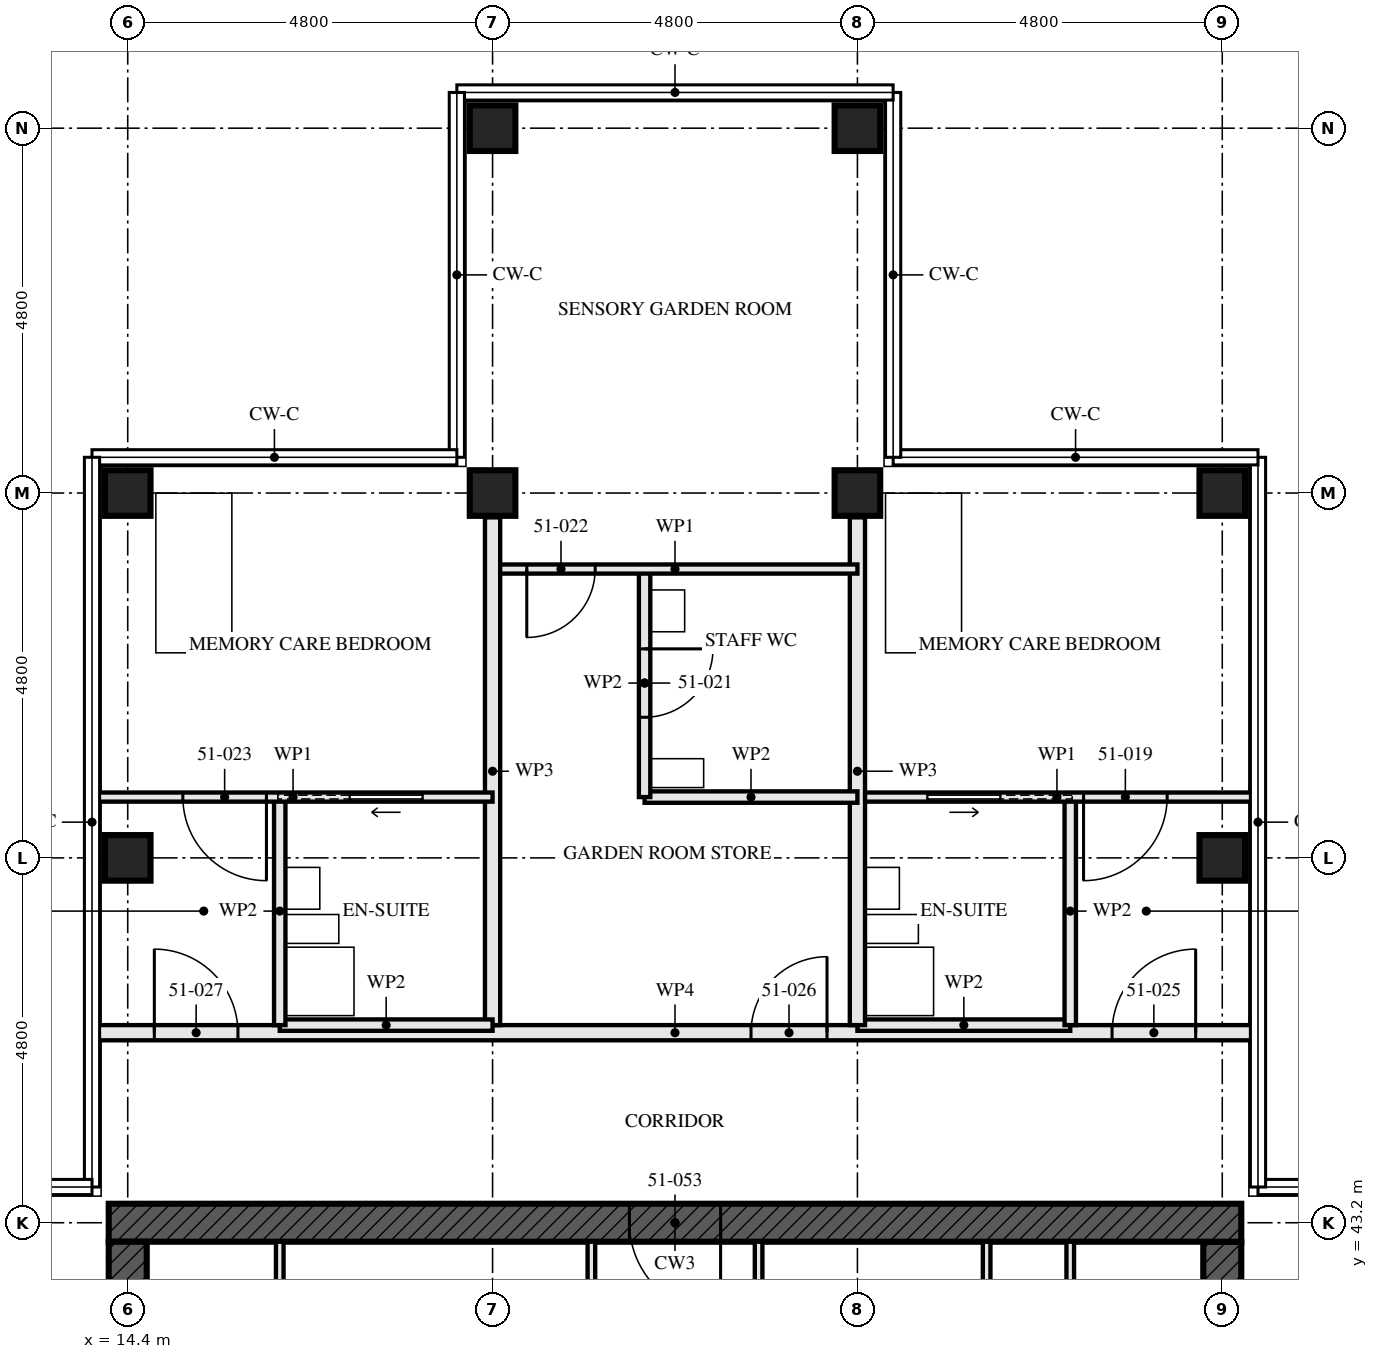
"""IFC4 building model, lengths in metres.
Left out: names, types, materials, properties, quantities, classifications, styles, units other than length and angle.
Written with IfcOpenShell. Run it as: python <this file> out.ifc"""

import sys

from ifc_helpers import new_model, si_unit, direction, frame, frame_2d, origin, origin_2d, place, context, subcontext, project, spatial, rectangle, hollow_rectangle, extrude, element, fill, save


model = new_model("IFC4")
c1 = context("Model", 3, precision=1e-05, world=origin(), true_north=direction((0.0, 1.0)))
c2 = subcontext(c1, "Body", "Model", "MODEL_VIEW")
j1 = project(units=[si_unit("LENGTHUNIT", "METRE"), si_unit("PLANEANGLEUNIT", "RADIAN")], contexts=[c1])
p1 = place(None, origin())
s1 = spatial("IfcSite", under=j1, at=p1, CompositionType="ELEMENT")
p2 = place(p1, origin())
s2 = spatial("IfcBuilding", under=s1, at=p2, CompositionType="ELEMENT")
p3 = place(p2, frame((0.0, 0.0, 186.5)))
s3 = spatial("IfcBuildingStorey", under=s2, at=p3, CompositionType="ELEMENT", Elevation=186.5)
for number, where, z_axis, x_axis in (
    (1, (14.4, 48.0, 0.0), (0.0, 0.0, 1.0), (1.0, 0.0, 0.0)),
    (2, (14.4, 52.8, 0.0), (0.0, 0.0, 1.0), (0.0, 1.0, 0.0)),
    (3, (19.2, 52.8, 0.0), (0.0, 0.0, 1.0), (0.0, 1.0, 0.0)),
    (4, (19.2, 57.6, 0.0), (0.0, 0.0, 1.0), (0.0, 1.0, 0.0)),
    (5, (24.0, 52.8, 0.0), (0.0, 0.0, 1.0), (0.0, 1.0, 0.0)),
    (6, (24.0, 57.6, 0.0), (0.0, 0.0, 1.0), (0.0, 1.0, 0.0)),
    (7, (28.8, 48.0, 0.0), (0.0, 0.0, 1.0), (1.0, 0.0, 0.0)),
    (8, (28.8, 52.8, 0.0), (0.0, 0.0, 1.0), (0.0, 1.0, 0.0)),
):
    element("IfcColumn", number, at=place(p3, frame(where, z_axis=z_axis, x_axis=x_axis)), inside=s3, PredefinedType="COLUMN", context=c2, shape_type="SweptSolid", body=[
        extrude(hollow_rectangle(XDim=0.6, YDim=0.6, WallThickness=0.08, at=origin_2d()), origin(), (0.0, 0.0, 1.0), 3.5),
    ])
p4 = place(p3, frame((29.05, 43.2, -0.17), z_axis=(0.0, 0.0, 1.0), x_axis=(-1.0, 0.0, 0.0)))
e9 = element("IfcWall", 9, at=p4, inside=s3, PredefinedType="SHEAR", context=c2, shape_type="SweptSolid", body=[
    extrude(rectangle(XDim=14.9, YDim=0.5, at=frame_2d((7.45, 0.0))), origin(), (0.0, 0.0, 1.0), 3.42),
])
p5 = place(p4, frame((6.85, 0.0, 0.17)))
e10 = element("IfcOpeningElement", 10, at=p5, cuts=e9, PredefinedType="OPENING", context=c2, shape_type="SweptSolid", body=[
    extrude(rectangle(XDim=1.2, YDim=2.1, at=frame_2d((0.6, 1.05))), frame((0.0, 0.26, 0.0), z_axis=(0.0, -1.0, 0.0), x_axis=(1.0, 0.0, 0.0)), (0.0, 0.0, 1.0), 0.521),
])
p6 = place(p3, frame((14.4, 42.95, -0.17), z_axis=(0.0, 0.0, 1.0), x_axis=(0.0, -1.0, 0.0)))
e11 = element("IfcWall", 11, at=p6, inside=s3, PredefinedType="SHEAR", context=c2, shape_type="SweptSolid", body=[
    extrude(rectangle(XDim=13.9, YDim=0.5, at=frame_2d((6.95, 0.0))), origin(), (0.0, 0.0, 1.0), 3.42),
])
p7 = place(p6, frame((6.35, 0.0, 0.17)))
e12 = element("IfcOpeningElement", 12, at=p7, cuts=e11, PredefinedType="OPENING", context=c2, shape_type="SweptSolid", body=[
    extrude(rectangle(XDim=1.2, YDim=2.1, at=frame_2d((0.6, 1.05))), frame((0.0, 0.26, 0.0), z_axis=(0.0, -1.0, 0.0), x_axis=(1.0, 0.0, 0.0)), (0.0, 0.0, 1.0), 0.521),
])
p8 = place(p3, frame((28.8, 29.05, -0.17), z_axis=(0.0, 0.0, 1.0), x_axis=(0.0, 1.0, 0.0)))
e13 = element("IfcWall", 13, at=p8, inside=s3, PredefinedType="SHEAR", context=c2, shape_type="SweptSolid", body=[
    extrude(rectangle(XDim=13.9, YDim=0.5, at=frame_2d((6.95, 0.0))), origin(), (0.0, 0.0, 1.0), 3.42),
])
p9 = place(p8, frame((6.35, 0.0, 0.17)))
e14 = element("IfcOpeningElement", 14, at=p9, cuts=e13, PredefinedType="OPENING", context=c2, shape_type="SweptSolid", body=[
    extrude(rectangle(XDim=1.2, YDim=2.1, at=frame_2d((0.6, 1.05))), frame((0.0, 0.26, 0.0), z_axis=(0.0, -1.0, 0.0), x_axis=(1.0, 0.0, 0.0)), (0.0, 0.0, 1.0), 0.521),
])
p10 = place(p3, frame((26.8, 48.8, 0.0), z_axis=(0.0, 0.0, 1.0), x_axis=(0.0, -1.0, 0.0)))
e15 = element("IfcWall", 15, at=p10, inside=s3, PredefinedType="PARTITIONING", context=c2, shape_type="SweptSolid", body=[
    extrude(rectangle(XDim=3.0, YDim=0.15, at=frame_2d((1.5, 0.0))), origin(), (0.0, 0.0, 1.0), 2.04),
])
p11 = place(p3, frame((26.8, 45.8, 0.0), z_axis=(0.0, 0.0, 1.0), x_axis=(-1.0, 0.0, 0.0)))
e16 = element("IfcWall", 16, at=p11, inside=s3, PredefinedType="PARTITIONING", context=c2, shape_type="SweptSolid", body=[
    extrude(rectangle(XDim=2.8, YDim=0.15, at=frame_2d((1.4, 0.0))), origin(), (0.0, 0.0, 1.0), 3.25),
])
p12 = place(p3, frame((29.25, 48.8, 0.0), z_axis=(0.0, 0.0, 1.0), x_axis=(-1.0, 0.0, 0.0)))
e17 = element("IfcWall", 17, at=p12, inside=s3, PredefinedType="PARTITIONING", context=c2, shape_type="SweptSolid", body=[
    extrude(rectangle(XDim=5.25, YDim=0.12, at=frame_2d((2.625, 0.0))), origin(), (0.0, 0.0, 1.0), 2.04),
])
p13 = place(p12, frame((1.175, 0.0, 0.0)))
e18 = element("IfcOpeningElement", 18, at=p13, cuts=e17, PredefinedType="OPENING", context=c2, shape_type="SweptSolid", body=[
    extrude(rectangle(XDim=1.1, YDim=2.0, at=frame_2d((0.55, 1.0))), frame((0.0, 0.071, 0.0), z_axis=(0.0, -1.0, 0.0), x_axis=(1.0, 0.0, 0.0)), (0.0, 0.0, 1.0), 0.141),
])
p14 = place(p12, frame((3.375, 0.0, 0.0)))
e19 = element("IfcOpeningElement", 19, at=p14, cuts=e17, PredefinedType="OPENING", context=c2, shape_type="SweptSolid", body=[
    extrude(rectangle(XDim=0.95, YDim=2.0, at=frame_2d((0.475, 1.0))), frame((0.0, 0.071, 0.0), z_axis=(0.0, -1.0, 0.0), x_axis=(1.0, 0.0, 0.0)), (0.0, 0.0, 1.0), 0.141),
])
p15 = place(p3, frame((24.0, 52.48, 0.0), z_axis=(0.0, 0.0, 1.0), x_axis=(0.0, -1.0, 0.0)))
e20 = element("IfcWall", 20, at=p15, inside=s3, PredefinedType="PARTITIONING", context=c2, shape_type="SweptSolid", body=[
    extrude(rectangle(XDim=6.68, YDim=0.2, at=frame_2d((3.34, 0.0))), origin(), (0.0, 0.0, 1.0), 2.04),
])
p16 = place(p3, frame((21.2, 51.8, 0.0), z_axis=(0.0, 0.0, 1.0), x_axis=(0.0, -1.0, 0.0)))
e21 = element("IfcWall", 21, at=p16, inside=s3, PredefinedType="PARTITIONING", context=c2, shape_type="SweptSolid", body=[
    extrude(rectangle(XDim=3.0, YDim=0.15, at=frame_2d((1.5, 0.0))), origin(), (0.0, 0.0, 1.0), 3.25),
])
p17 = place(p16, frame((1.05, 0.0, 0.0)))
e22 = element("IfcOpeningElement", 22, at=p17, cuts=e21, PredefinedType="OPENING", context=c2, shape_type="SweptSolid", body=[
    extrude(rectangle(XDim=0.9, YDim=2.1, at=frame_2d((0.45, 1.05))), frame((0.0, 0.085, 0.0), z_axis=(0.0, -1.0, 0.0), x_axis=(1.0, 0.0, 0.0)), (0.0, 0.0, 1.0), 0.171),
])
p18 = place(p3, frame((24.0, 48.8, 0.0), z_axis=(0.0, 0.0, 1.0), x_axis=(-1.0, 0.0, 0.0)))
e23 = element("IfcWall", 23, at=p18, inside=s3, PredefinedType="PARTITIONING", context=c2, shape_type="SweptSolid", body=[
    extrude(rectangle(XDim=2.8, YDim=0.15, at=frame_2d((1.4, 0.0))), origin(), (0.0, 0.0, 1.0), 3.25),
])
p19 = place(p3, frame((24.0, 51.8, 0.0), z_axis=(0.0, 0.0, 1.0), x_axis=(-1.0, 0.0, 0.0)))
e24 = element("IfcWall", 24, at=p19, inside=s3, PredefinedType="PARTITIONING", context=c2, shape_type="SweptSolid", body=[
    extrude(rectangle(XDim=4.8, YDim=0.12, at=frame_2d((2.4, 0.0))), origin(), (0.0, 0.0, 1.0), 3.25),
])
p20 = place(p19, frame((3.45, 0.0, 0.0)))
e25 = element("IfcOpeningElement", 25, at=p20, cuts=e24, PredefinedType="OPENING", context=c2, shape_type="SweptSolid", body=[
    extrude(rectangle(XDim=0.9, YDim=2.1, at=frame_2d((0.45, 1.05))), frame((0.0, 0.071, 0.0), z_axis=(0.0, -1.0, 0.0), x_axis=(1.0, 0.0, 0.0)), (0.0, 0.0, 1.0), 0.141),
])
p21 = place(p3, frame((19.2, 52.48, 0.0), z_axis=(0.0, 0.0, 1.0), x_axis=(0.0, -1.0, 0.0)))
e26 = element("IfcWall", 26, at=p21, inside=s3, PredefinedType="PARTITIONING", context=c2, shape_type="SweptSolid", body=[
    extrude(rectangle(XDim=6.68, YDim=0.2, at=frame_2d((3.34, 0.0))), origin(), (0.0, 0.0, 1.0), 2.04),
])
p22 = place(p3, frame((16.4, 48.8, 0.0), z_axis=(0.0, 0.0, 1.0), x_axis=(0.0, -1.0, 0.0)))
e27 = element("IfcWall", 27, at=p22, inside=s3, PredefinedType="PARTITIONING", context=c2, shape_type="SweptSolid", body=[
    extrude(rectangle(XDim=3.0, YDim=0.15, at=frame_2d((1.5, 0.0))), origin(), (0.0, 0.0, 1.0), 2.04),
])
p23 = place(p3, frame((19.2, 45.8, 0.0), z_axis=(0.0, 0.0, 1.0), x_axis=(-1.0, 0.0, 0.0)))
e28 = element("IfcWall", 28, at=p23, inside=s3, PredefinedType="PARTITIONING", context=c2, shape_type="SweptSolid", body=[
    extrude(rectangle(XDim=2.8, YDim=0.15, at=frame_2d((1.4, 0.0))), origin(), (0.0, 0.0, 1.0), 3.25),
])
p24 = place(p3, frame((19.2, 48.8, 0.0), z_axis=(0.0, 0.0, 1.0), x_axis=(-1.0, 0.0, 0.0)))
e29 = element("IfcWall", 29, at=p24, inside=s3, PredefinedType="PARTITIONING", context=c2, shape_type="SweptSolid", body=[
    extrude(rectangle(XDim=5.25, YDim=0.12, at=frame_2d((2.625, 0.0))), origin(), (0.0, 0.0, 1.0), 2.04),
])
p25 = place(p24, frame((2.975, 0.0, 0.0)))
e30 = element("IfcOpeningElement", 30, at=p25, cuts=e29, PredefinedType="OPENING", context=c2, shape_type="SweptSolid", body=[
    extrude(rectangle(XDim=1.1, YDim=2.0, at=frame_2d((0.55, 1.0))), frame((0.0, 0.071, 0.0), z_axis=(0.0, -1.0, 0.0), x_axis=(1.0, 0.0, 0.0)), (0.0, 0.0, 1.0), 0.141),
])
p26 = place(p24, frame((0.925, 0.0, 0.0)))
e31 = element("IfcOpeningElement", 31, at=p26, cuts=e29, PredefinedType="OPENING", context=c2, shape_type="SweptSolid", body=[
    extrude(rectangle(XDim=0.95, YDim=2.0, at=frame_2d((0.475, 1.0))), frame((0.0, 0.071, 0.0), z_axis=(0.0, -1.0, 0.0), x_axis=(1.0, 0.0, 0.0)), (0.0, 0.0, 1.0), 0.141),
])
p27 = place(p3, frame((29.25, 45.7, 0.0), z_axis=(0.0, 0.0, 1.0), x_axis=(-1.0, 0.0, 0.0)))
e32 = element("IfcWall", 32, at=p27, inside=s3, PredefinedType="PARTITIONING", context=c2, shape_type="SweptSolid", body=[
    extrude(rectangle(XDim=15.3, YDim=0.2, at=frame_2d((7.65, 0.0))), origin(), (0.0, 0.0, 1.0), 2.04),
])
p28 = place(p27, frame((0.8, 0.0, 0.0)))
e33 = element("IfcOpeningElement", 33, at=p28, cuts=e32, PredefinedType="OPENING", context=c2, shape_type="SweptSolid", body=[
    extrude(rectangle(XDim=1.1, YDim=2.0, at=frame_2d((0.55, 1.0))), frame((0.0, 0.111, 0.0), z_axis=(0.0, -1.0, 0.0), x_axis=(1.0, 0.0, 0.0)), (0.0, 0.0, 1.0), 0.221),
])
p29 = place(p27, frame((5.65, 0.0, 0.0)))
e34 = element("IfcOpeningElement", 34, at=p29, cuts=e32, PredefinedType="OPENING", context=c2, shape_type="SweptSolid", body=[
    extrude(rectangle(XDim=1.0, YDim=2.0, at=frame_2d((0.5, 1.0))), frame((0.0, 0.111, 0.0), z_axis=(0.0, -1.0, 0.0), x_axis=(1.0, 0.0, 0.0)), (0.0, 0.0, 1.0), 0.221),
])
p30 = place(p27, frame((13.4, 0.0, 0.0)))
e35 = element("IfcOpeningElement", 35, at=p30, cuts=e32, PredefinedType="OPENING", context=c2, shape_type="SweptSolid", body=[
    extrude(rectangle(XDim=1.1, YDim=2.0, at=frame_2d((0.55, 1.0))), frame((0.0, 0.111, 0.0), z_axis=(0.0, -1.0, 0.0), x_axis=(1.0, 0.0, 0.0)), (0.0, 0.0, 1.0), 0.221),
])
for number, where, z_axis, x_axis in (
    (36, (16.4, 37.15, 0.0), (0.0, 0.0, 1.0), (0.0, 1.0, 0.0)),
    (37, (26.8, 37.15, 0.0), (0.0, 0.0, 1.0), (0.0, 1.0, 0.0)),
):
    element("IfcWall", number, at=place(p3, frame(where, z_axis=z_axis, x_axis=x_axis)), inside=s3, PredefinedType="SOLIDWALL", context=c2, shape_type="SweptSolid", body=[
        extrude(rectangle(XDim=5.8, YDim=0.1, at=frame_2d((2.9, 0.0))), origin(), (0.0, 0.0, 1.0), 3.25),
    ])
p31 = place(p3, frame((20.5, 37.15, 0.0), z_axis=(0.0, 0.0, 1.0), x_axis=(0.0, 1.0, 0.0)))
e38 = element("IfcWall", 38, at=p31, inside=s3, PredefinedType="SOLIDWALL", context=c2, shape_type="SweptSolid", body=[
    extrude(rectangle(XDim=5.8, YDim=0.1, at=frame_2d((2.9, 0.0))), origin(), (0.0, 0.0, 1.0), 3.25),
])
p32 = place(p31, frame((0.975, 0.0, 0.0)))
e39 = element("IfcOpeningElement", 39, at=p32, cuts=e38, PredefinedType="OPENING", context=c2, shape_type="SweptSolid", body=[
    extrude(rectangle(XDim=0.9, YDim=2.1, at=frame_2d((0.45, 1.05))), frame((0.0, 0.061, 0.0), z_axis=(0.0, -1.0, 0.0), x_axis=(1.0, 0.0, 0.0)), (0.0, 0.0, 1.0), 0.121),
])
p33 = place(p3, frame((22.7, 37.15, 0.0), z_axis=(0.0, 0.0, 1.0), x_axis=(0.0, 1.0, 0.0)))
e40 = element("IfcWall", 40, at=p33, inside=s3, PredefinedType="SOLIDWALL", context=c2, shape_type="SweptSolid", body=[
    extrude(rectangle(XDim=5.8, YDim=0.1, at=frame_2d((2.9, 0.0))), origin(), (0.0, 0.0, 1.0), 3.25),
])
p34 = place(p33, frame((0.975, 0.0, 0.0)))
e41 = element("IfcOpeningElement", 41, at=p34, cuts=e40, PredefinedType="OPENING", context=c2, shape_type="SweptSolid", body=[
    extrude(rectangle(XDim=0.9, YDim=2.1, at=frame_2d((0.45, 1.05))), frame((0.0, 0.061, 0.0), z_axis=(0.0, -1.0, 0.0), x_axis=(1.0, 0.0, 0.0)), (0.0, 0.0, 1.0), 0.121),
])
p35 = place(p3, frame((25.7, 37.15, 0.0), z_axis=(0.0, 0.0, 1.0), x_axis=(0.0, 1.0, 0.0)))
e42 = element("IfcWall", 42, at=p35, inside=s3, PredefinedType="SOLIDWALL", context=c2, shape_type="SweptSolid", body=[
    extrude(rectangle(XDim=5.8, YDim=0.1, at=frame_2d((2.9, 0.0))), origin(), (0.0, 0.0, 1.0), 3.25),
])
p36 = place(p13, origin())
e43 = element("IfcDoor", 43, at=p36, inside=s3, OperationType="SINGLE_SWING_LEFT", PredefinedType="DOOR", context=c2, shape_type="SweptSolid", body=[
    extrude(rectangle(XDim=1.1, YDim=2.0, at=frame_2d((0.55, 1.0))), frame((0.0, 0.022, 0.0), z_axis=(0.0, -1.0, 0.0), x_axis=(1.0, 0.0, 0.0)), (0.0, 0.0, 1.0), 0.044),
])
fill(e18, e43)
p37 = place(p14, origin())
e44 = element("IfcDoor", 44, at=p37, inside=s3, OperationType="SLIDING_TO_RIGHT", PredefinedType="DOOR", context=c2, shape_type="SweptSolid", body=[
    extrude(rectangle(XDim=0.95, YDim=2.0, at=frame_2d((0.475, 1.0))), frame((0.0, 0.022, 0.0), z_axis=(0.0, -1.0, 0.0), x_axis=(1.0, 0.0, 0.0)), (0.0, 0.0, 1.0), 0.044),
])
fill(e19, e44)
p38 = place(p17, origin())
e45 = element("IfcDoor", 45, at=p38, inside=s3, OperationType="SINGLE_SWING_RIGHT", PredefinedType="DOOR", context=c2, shape_type="SweptSolid", body=[
    extrude(rectangle(XDim=0.9, YDim=2.1, at=frame_2d((0.45, 1.05))), frame((0.0, 0.022, 0.0), z_axis=(0.0, -1.0, 0.0), x_axis=(1.0, 0.0, 0.0)), (0.0, 0.0, 1.0), 0.044),
])
fill(e22, e45)
p39 = place(p20, origin())
e46 = element("IfcDoor", 46, at=p39, inside=s3, OperationType="SINGLE_SWING_LEFT", PredefinedType="DOOR", context=c2, shape_type="SweptSolid", body=[
    extrude(rectangle(XDim=0.9, YDim=2.1, at=frame_2d((0.45, 1.05))), frame((0.0, 0.022, 0.0), z_axis=(0.0, -1.0, 0.0), x_axis=(1.0, 0.0, 0.0)), (0.0, 0.0, 1.0), 0.044),
])
fill(e25, e46)
p40 = place(p25, origin())
e47 = element("IfcDoor", 47, at=p40, inside=s3, OperationType="SINGLE_SWING_RIGHT", PredefinedType="DOOR", context=c2, shape_type="SweptSolid", body=[
    extrude(rectangle(XDim=1.1, YDim=2.0, at=frame_2d((0.55, 1.0))), frame((0.0, 0.022, 0.0), z_axis=(0.0, -1.0, 0.0), x_axis=(1.0, 0.0, 0.0)), (0.0, 0.0, 1.0), 0.044),
])
fill(e30, e47)
p41 = place(p26, origin())
e48 = element("IfcDoor", 48, at=p41, inside=s3, OperationType="SLIDING_TO_LEFT", PredefinedType="DOOR", context=c2, shape_type="SweptSolid", body=[
    extrude(rectangle(XDim=0.95, YDim=2.0, at=frame_2d((0.475, 1.0))), frame((0.0, 0.022, 0.0), z_axis=(0.0, -1.0, 0.0), x_axis=(1.0, 0.0, 0.0)), (0.0, 0.0, 1.0), 0.044),
])
fill(e31, e48)
p42 = place(p28, frame((1.1, 0.0, 0.0), z_axis=(0.0, 0.0, 1.0), x_axis=(-1.0, 0.0, 0.0)))
e49 = element("IfcDoor", 49, at=p42, inside=s3, OperationType="SINGLE_SWING_LEFT", PredefinedType="DOOR", context=c2, shape_type="SweptSolid", body=[
    extrude(rectangle(XDim=1.1, YDim=2.0, at=frame_2d((0.55, 1.0))), frame((0.0, 0.027, 0.0), z_axis=(0.0, -1.0, 0.0), x_axis=(1.0, 0.0, 0.0)), (0.0, 0.0, 1.0), 0.054),
])
fill(e33, e49)
p43 = place(p29, frame((1.0, 0.0, 0.0), z_axis=(0.0, 0.0, 1.0), x_axis=(-1.0, 0.0, 0.0)))
e50 = element("IfcDoor", 50, at=p43, inside=s3, OperationType="SINGLE_SWING_LEFT", PredefinedType="DOOR", context=c2, shape_type="SweptSolid", body=[
    extrude(rectangle(XDim=1.0, YDim=2.0, at=frame_2d((0.5, 1.0))), frame((0.0, 0.027, 0.0), z_axis=(0.0, -1.0, 0.0), x_axis=(1.0, 0.0, 0.0)), (0.0, 0.0, 1.0), 0.054),
])
fill(e34, e50)
p44 = place(p30, frame((1.1, 0.0, 0.0), z_axis=(0.0, 0.0, 1.0), x_axis=(-1.0, 0.0, 0.0)))
e51 = element("IfcDoor", 51, at=p44, inside=s3, OperationType="SINGLE_SWING_RIGHT", PredefinedType="DOOR", context=c2, shape_type="SweptSolid", body=[
    extrude(rectangle(XDim=1.1, YDim=2.0, at=frame_2d((0.55, 1.0))), frame((0.0, 0.027, 0.0), z_axis=(0.0, -1.0, 0.0), x_axis=(1.0, 0.0, 0.0)), (0.0, 0.0, 1.0), 0.054),
])
fill(e35, e51)
p45 = place(p5, origin())
e52 = element("IfcDoor", 52, at=p45, inside=s3, OperationType="SINGLE_SWING_LEFT", PredefinedType="DOOR", context=c2, shape_type="SweptSolid", body=[
    extrude(rectangle(XDim=1.2, YDim=2.1, at=frame_2d((0.6, 1.05))), frame((0.0, 0.027, 0.0), z_axis=(0.0, -1.0, 0.0), x_axis=(1.0, 0.0, 0.0)), (0.0, 0.0, 1.0), 0.054),
])
fill(e10, e52)
save(model, sys.argv[1])
